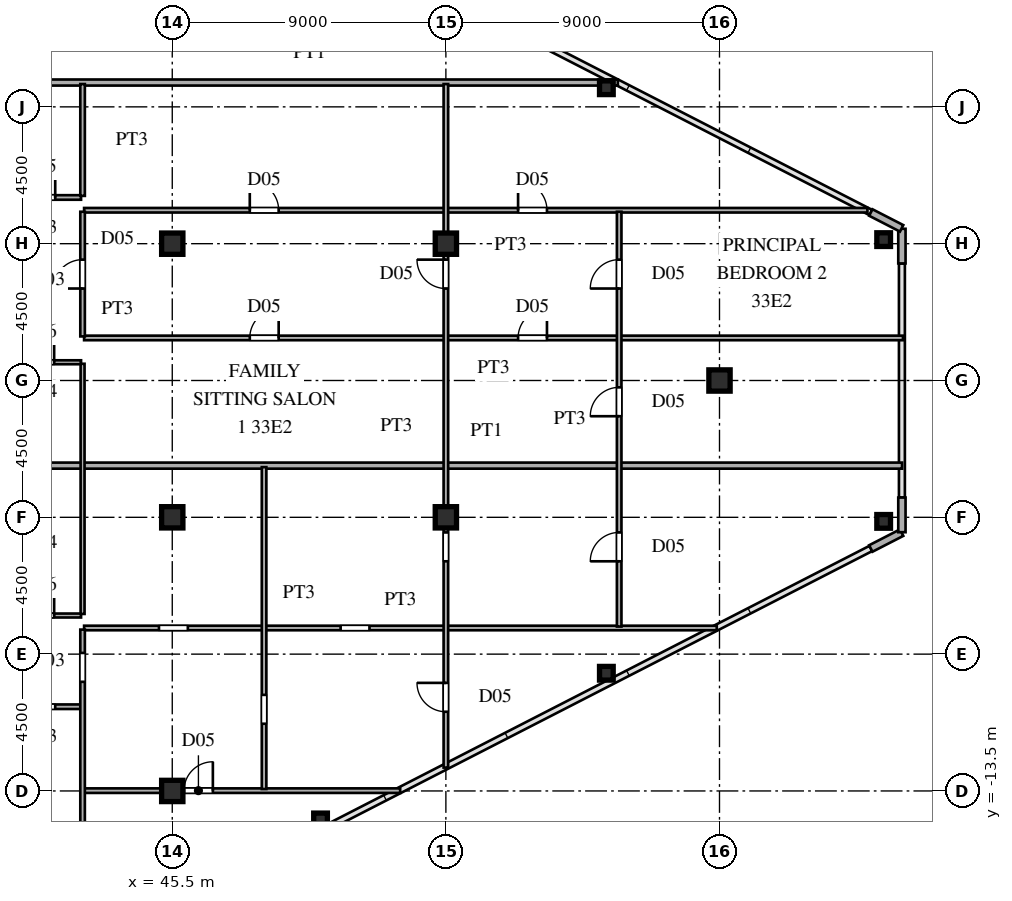
"""IFC4 building model, lengths in metres.
Left out: names, types, materials, properties, quantities, classifications, styles, units other than length and angle.
Written with IfcOpenShell. Run it as: python <this file> out.ifc"""

import sys

from ifc_helpers import new_model, si_unit, direction, frame, frame_2d, origin, origin_2d, place, context, subcontext, project, spatial, rectangle, hollow_rectangle, i_section, extrude, source, transform, mapped, element, fill, save


model = new_model("IFC4")
c1 = context("Model", 3, precision=1e-05, world=origin(), true_north=direction((0.0, 1.0)))
c2 = subcontext(c1, "Body", "Model", "MODEL_VIEW")
j1 = project(units=[si_unit("LENGTHUNIT", "METRE"), si_unit("PLANEANGLEUNIT", "RADIAN")], contexts=[c1])
p1 = place(None, origin())
s1 = spatial("IfcSite", under=j1, at=p1, CompositionType="ELEMENT")
p2 = place(p1, origin())
s2 = spatial("IfcBuilding", under=s1, at=p2, CompositionType="ELEMENT")
p3 = place(p2, frame((0.0, 0.0, 124.8)))
s3 = spatial("IfcBuildingStorey", under=s2, at=p3, CompositionType="ELEMENT", Elevation=124.8)
m1 = source(origin(), c2, "Body", "SweptSolid", [
    extrude(i_section(OverallWidth=0.7, OverallDepth=0.7, WebThickness=0.028, FlangeThickness=0.045, at=origin_2d()), origin(), (0.0, 0.0, 1.0), 3.6),
])
for number, where, z_axis, x_axis in (
    (1, (45.5, -13.5, 0.0), (0.0, 0.0, 1.0), (1.0, 0.0, 0.0)),
    (2, (45.5, -4.5, 0.0), (0.0, 0.0, 1.0), (1.0, 0.0, 0.0)),
    (3, (45.5, 4.5, 0.0), (0.0, 0.0, 1.0), (1.0, 0.0, 0.0)),
    (4, (54.5, -4.5, 0.0), (0.0, 0.0, 1.0), (1.0, 0.0, 0.0)),
    (5, (54.5, 4.5, 0.0), (0.0, 0.0, 1.0), (1.0, 0.0, 0.0)),
    (6, (63.5, 0.0, 0.0), (0.0, 0.0, 1.0), (1.0, 0.0, 0.0)),
):
    element("IfcColumn", number, at=place(p3, frame(where, z_axis=z_axis, x_axis=x_axis)), inside=s3, PredefinedType="COLUMN", context=c2, shape_type="MappedRepresentation", body=[
        mapped(m1, transform((0.0, 0.0, 0.0), scale=1.0)),
    ])
m2 = source(origin(), c2, "Body", "SweptSolid", [
    extrude(hollow_rectangle(XDim=0.45, YDim=0.45, WallThickness=0.018, at=origin_2d()), origin(), (0.0, 0.0, 1.0), 3.6),
])
for number, where, z_axis, x_axis in (
    (7, (68.9, -4.634, 0.0), (0.0, 0.0, 1.0), (1.0, 0.0, 0.0)),
    (8, (68.9, 4.634, 0.0), (0.0, 0.0, 1.0), (1.0, 0.0, 0.0)),
    (9, (50.377, -14.453, 0.0), (0.0, 0.0, 1.0), (1.0, 0.0, 0.0)),
    (10, (59.779, -9.629, 0.0), (0.0, 0.0, 1.0), (1.0, 0.0, 0.0)),
    (11, (59.779, 9.629, 0.0), (0.0, 0.0, 1.0), (1.0, 0.0, 0.0)),
):
    element("IfcColumn", number, at=place(p3, frame(where, z_axis=z_axis, x_axis=x_axis)), inside=s3, PredefinedType="COLUMN", context=c2, shape_type="MappedRepresentation", body=[
        mapped(m2, transform((0.0, 0.0, 0.0), scale=1.0)),
    ])
p4 = place(p3, frame((68.477, -5.525, 0.0), z_axis=(0.0, 0.0, 1.0), x_axis=(0.889797395748, 0.456355776255, 0.0)))
e12 = element("IfcWall", 12, at=p4, inside=s3, PredefinedType="SOLIDWALL", context=c2, shape_type="SweptSolid", body=[
    extrude(rectangle(XDim=1.14, YDim=0.24, at=frame_2d((0.57, 0.0))), origin(), (0.0, 0.0, 1.0), 3.38),
])
for number, where, z_axis, x_axis in (
    (13, (69.5, -4.99, 0.0), (0.0, 0.0, 1.0), (0.0, 1.0, 0.0)),
    (14, (69.5, 3.85, 0.0), (0.0, 0.0, 1.0), (0.0, 1.0, 0.0)),
):
    element("IfcWall", number, at=place(p3, frame(where, z_axis=z_axis, x_axis=x_axis)), inside=s3, PredefinedType="SOLIDWALL", context=c2, shape_type="SweptSolid", body=[
        extrude(rectangle(XDim=1.14, YDim=0.24, at=frame_2d((0.57, 0.0))), origin(), (0.0, 0.0, 1.0), 3.38),
    ])
p5 = place(p3, frame((69.491, 5.005, 0.0), z_axis=(0.0, 0.0, 1.0), x_axis=(-0.889797395748, 0.456355776255, 0.0)))
e15 = element("IfcWall", 15, at=p5, inside=s3, PredefinedType="SOLIDWALL", context=c2, shape_type="SweptSolid", body=[
    extrude(rectangle(XDim=1.14, YDim=0.24, at=frame_2d((0.57, 0.0))), origin(), (0.0, 0.0, 1.0), 3.38),
])
p6 = place(p3, frame((42.6, -13.49, 0.0), z_axis=(0.0, 0.0, 1.0), x_axis=(1.0, 0.0, 0.0)))
e16 = element("IfcWall", 16, at=p6, inside=s3, PredefinedType="PARTITIONING", context=c2, shape_type="SweptSolid", body=[
    extrude(rectangle(XDim=10.397, YDim=0.15, at=frame_2d((5.198, 0.0))), origin(), (0.0, 0.0, 1.0), 2.78),
])
p7 = place(p6, frame((3.285, 0.0, 0.0)))
e17 = element("IfcOpeningElement", 17, at=p7, cuts=e16, PredefinedType="OPENING", context=c2, shape_type="SweptSolid", body=[
    extrude(rectangle(XDim=0.95, YDim=2.15, at=frame_2d((0.475, 1.075))), frame((0.0, 0.085, 0.0), z_axis=(0.0, -1.0, 0.0), x_axis=(1.0, 0.0, 0.0)), (0.0, 0.0, 1.0), 0.17),
])
p8 = place(p3, frame((39.85, -10.73, 0.0), z_axis=(0.0, 0.0, 1.0), x_axis=(1.0, 0.0, 0.0)))
e18 = element("IfcWall", 18, at=p8, inside=s3, PredefinedType="PARTITIONING", context=c2, shape_type="SweptSolid", body=[
    extrude(rectangle(XDim=2.65, YDim=0.15, at=frame_2d((1.325, 0.0))), origin(), (0.0, 0.0, 1.0), 3.38),
])
p9 = place(p8, frame((0.85, 0.0, 0.0)))
e19 = element("IfcOpeningElement", 19, at=p9, cuts=e18, PredefinedType="OPENING", context=c2, shape_type="SweptSolid", body=[
    extrude(rectangle(XDim=0.95, YDim=2.15, at=frame_2d((0.475, 1.075))), frame((0.0, 0.085, 0.0), z_axis=(0.0, -1.0, 0.0), x_axis=(1.0, 0.0, 0.0)), (0.0, 0.0, 1.0), 0.17),
])
p10 = place(p3, frame((42.6, -8.14, 0.0), z_axis=(0.0, 0.0, 1.0), x_axis=(1.0, 0.0, 0.0)))
e20 = element("IfcWall", 20, at=p10, inside=s3, PredefinedType="PARTITIONING", context=c2, shape_type="SweptSolid", body=[
    extrude(rectangle(XDim=20.81, YDim=0.15, at=frame_2d((10.405, 0.0))), origin(), (0.0, 0.0, 1.0), 3.38),
])
p11 = place(p10, frame((2.462, 0.0, 0.0)))
e21 = element("IfcOpeningElement", 21, at=p11, cuts=e20, PredefinedType="OPENING", context=c2, shape_type="SweptSolid", body=[
    extrude(rectangle(XDim=0.95, YDim=2.15, at=frame_2d((0.475, 1.075))), frame((0.0, 0.085, 0.0), z_axis=(0.0, -1.0, 0.0), x_axis=(1.0, 0.0, 0.0)), (0.0, 0.0, 1.0), 0.17),
])
p12 = place(p10, frame((8.438, 0.0, 0.0)))
e22 = element("IfcOpeningElement", 22, at=p12, cuts=e20, PredefinedType="OPENING", context=c2, shape_type="SweptSolid", body=[
    extrude(rectangle(XDim=0.95, YDim=2.15, at=frame_2d((0.475, 1.075))), frame((0.0, 0.085, 0.0), z_axis=(0.0, -1.0, 0.0), x_axis=(1.0, 0.0, 0.0)), (0.0, 0.0, 1.0), 0.17),
])
p13 = place(p3, frame((39.85, -7.73, 0.0), z_axis=(0.0, 0.0, 1.0), x_axis=(1.0, 0.0, 0.0)))
e23 = element("IfcWall", 23, at=p13, inside=s3, PredefinedType="PARTITIONING", context=c2, shape_type="SweptSolid", body=[
    extrude(rectangle(XDim=2.65, YDim=0.13, at=frame_2d((1.325, 0.0))), origin(), (0.0, 0.0, 1.0), 3.38),
])
p14 = place(p13, frame((0.885, 0.0, 0.0)))
e24 = element("IfcOpeningElement", 24, at=p14, cuts=e23, PredefinedType="OPENING", context=c2, shape_type="SweptSolid", body=[
    extrude(rectangle(XDim=0.88, YDim=2.1, at=frame_2d((0.44, 1.05))), frame((0.0, 0.075, 0.0), z_axis=(0.0, -1.0, 0.0), x_axis=(1.0, 0.0, 0.0)), (0.0, 0.0, 1.0), 0.15),
])
p15 = place(p3, frame((39.88, -2.8, 0.0), z_axis=(0.0, 0.0, 1.0), x_axis=(1.0, 0.0, 0.0)))
e25 = element("IfcWall", 25, at=p15, inside=s3, PredefinedType="PARTITIONING", context=c2, shape_type="SweptSolid", body=[
    extrude(rectangle(XDim=29.625, YDim=0.2, at=frame_2d((14.812, 0.0))), origin(), (0.0, 0.0, 1.0), 3.38),
])
p16 = place(p3, frame((39.85, 0.6, 0.0), z_axis=(0.0, 0.0, 1.0), x_axis=(1.0, 0.0, 0.0)))
e26 = element("IfcWall", 26, at=p16, inside=s3, PredefinedType="PARTITIONING", context=c2, shape_type="SweptSolid", body=[
    extrude(rectangle(XDim=2.65, YDim=0.13, at=frame_2d((1.325, 0.0))), origin(), (0.0, 0.0, 1.0), 3.38),
])
p17 = place(p16, frame((0.885, 0.0, 0.0)))
e27 = element("IfcOpeningElement", 27, at=p17, cuts=e26, PredefinedType="OPENING", context=c2, shape_type="SweptSolid", body=[
    extrude(rectangle(XDim=0.88, YDim=2.1, at=frame_2d((0.44, 1.05))), frame((0.0, 0.075, 0.0), z_axis=(0.0, -1.0, 0.0), x_axis=(1.0, 0.0, 0.0)), (0.0, 0.0, 1.0), 0.15),
])
p18 = place(p3, frame((42.6, 1.4, 0.0), z_axis=(0.0, 0.0, 1.0), x_axis=(1.0, 0.0, 0.0)))
e28 = element("IfcWall", 28, at=p18, inside=s3, PredefinedType="PARTITIONING", context=c2, shape_type="SweptSolid", body=[
    extrude(rectangle(XDim=26.935, YDim=0.15, at=frame_2d((13.467, 0.0))), origin(), (0.0, 0.0, 1.0), 3.38),
])
p19 = place(p18, frame((5.45, 0.0, 0.0)))
e29 = element("IfcOpeningElement", 29, at=p19, cuts=e28, PredefinedType="OPENING", context=c2, shape_type="SweptSolid", body=[
    extrude(rectangle(XDim=0.95, YDim=2.15, at=frame_2d((0.475, 1.075))), frame((0.0, 0.085, 0.0), z_axis=(0.0, -1.0, 0.0), x_axis=(1.0, 0.0, 0.0)), (0.0, 0.0, 1.0), 0.17),
])
p20 = place(p18, frame((14.275, 0.0, 0.0)))
e30 = element("IfcOpeningElement", 30, at=p20, cuts=e28, PredefinedType="OPENING", context=c2, shape_type="SweptSolid", body=[
    extrude(rectangle(XDim=0.95, YDim=2.15, at=frame_2d((0.475, 1.075))), frame((0.0, 0.085, 0.0), z_axis=(0.0, -1.0, 0.0), x_axis=(1.0, 0.0, 0.0)), (0.0, 0.0, 1.0), 0.17),
])
p21 = place(p3, frame((42.6, 5.6, 0.0), z_axis=(0.0, 0.0, 1.0), x_axis=(1.0, 0.0, 0.0)))
e31 = element("IfcWall", 31, at=p21, inside=s3, PredefinedType="PARTITIONING", context=c2, shape_type="SweptSolid", body=[
    extrude(rectangle(XDim=25.766, YDim=0.15, at=frame_2d((12.883, 0.0))), origin(), (0.0, 0.0, 1.0), 3.38),
])
p22 = place(p21, frame((5.45, 0.0, 0.0)))
e32 = element("IfcOpeningElement", 32, at=p22, cuts=e31, PredefinedType="OPENING", context=c2, shape_type="SweptSolid", body=[
    extrude(rectangle(XDim=0.95, YDim=2.15, at=frame_2d((0.475, 1.075))), frame((0.0, 0.085, 0.0), z_axis=(0.0, -1.0, 0.0), x_axis=(1.0, 0.0, 0.0)), (0.0, 0.0, 1.0), 0.17),
])
p23 = place(p21, frame((14.275, 0.0, 0.0)))
e33 = element("IfcOpeningElement", 33, at=p23, cuts=e31, PredefinedType="OPENING", context=c2, shape_type="SweptSolid", body=[
    extrude(rectangle(XDim=0.95, YDim=2.15, at=frame_2d((0.475, 1.075))), frame((0.0, 0.085, 0.0), z_axis=(0.0, -1.0, 0.0), x_axis=(1.0, 0.0, 0.0)), (0.0, 0.0, 1.0), 0.17),
])
p24 = place(p3, frame((39.85, 6.02, 0.0), z_axis=(0.0, 0.0, 1.0), x_axis=(1.0, 0.0, 0.0)))
e34 = element("IfcWall", 34, at=p24, inside=s3, PredefinedType="PARTITIONING", context=c2, shape_type="SweptSolid", body=[
    extrude(rectangle(XDim=2.65, YDim=0.15, at=frame_2d((1.325, 0.0))), origin(), (0.0, 0.0, 1.0), 3.38),
])
p25 = place(p24, frame((0.85, 0.0, 0.0)))
e35 = element("IfcOpeningElement", 35, at=p25, cuts=e34, PredefinedType="OPENING", context=c2, shape_type="SweptSolid", body=[
    extrude(rectangle(XDim=0.95, YDim=2.15, at=frame_2d((0.475, 1.075))), frame((0.0, 0.085, 0.0), z_axis=(0.0, -1.0, 0.0), x_axis=(1.0, 0.0, 0.0)), (0.0, 0.0, 1.0), 0.17),
])
p26 = place(p3, frame((39.88, 9.8, 0.0), z_axis=(0.0, 0.0, 1.0), x_axis=(1.0, 0.0, 0.0)))
e36 = element("IfcWall", 36, at=p26, inside=s3, PredefinedType="PARTITIONING", context=c2, shape_type="SweptSolid", body=[
    extrude(rectangle(XDim=20.277, YDim=0.2, at=frame_2d((10.139, 0.0))), origin(), (0.0, 0.0, 1.0), 3.38),
])
p27 = place(p3, frame((42.55, -18.865, 0.0), z_axis=(0.0, 0.0, 1.0), x_axis=(0.0, 1.0, 0.0)))
e37 = element("IfcWall", 37, at=p27, inside=s3, PredefinedType="PARTITIONING", context=c2, shape_type="SweptSolid", body=[
    extrude(rectangle(XDim=10.672, YDim=0.15, at=frame_2d((5.336, 0.0))), origin(), (0.0, 0.0, 1.0), 3.38),
])
p28 = place(p27, frame((8.955, 0.0, 0.0)))
e38 = element("IfcOpeningElement", 38, at=p28, cuts=e37, PredefinedType="OPENING", context=c2, shape_type="SweptSolid", body=[
    extrude(rectangle(XDim=0.95, YDim=2.15, at=frame_2d((0.475, 1.075))), frame((0.0, 0.085, 0.0), z_axis=(0.0, -1.0, 0.0), x_axis=(1.0, 0.0, 0.0)), (0.0, 0.0, 1.0), 0.17),
])
p29 = place(p3, frame((42.55, -7.678, 0.0), z_axis=(0.0, 0.0, 1.0), x_axis=(0.0, 1.0, 0.0)))
e39 = element("IfcWall", 39, at=p29, inside=s3, PredefinedType="PARTITIONING", context=c2, shape_type="SweptSolid", body=[
    extrude(rectangle(XDim=8.228, YDim=0.13, at=frame_2d((4.114, 0.0))), origin(), (0.0, 0.0, 1.0), 3.38),
])
p30 = place(p3, frame((42.55, 1.45, 0.0), z_axis=(0.0, 0.0, 1.0), x_axis=(0.0, 1.0, 0.0)))
e40 = element("IfcWall", 40, at=p30, inside=s3, PredefinedType="PARTITIONING", context=c2, shape_type="SweptSolid", body=[
    extrude(rectangle(XDim=4.1, YDim=0.15, at=frame_2d((2.05, 0.0))), origin(), (0.0, 0.0, 1.0), 3.38),
])
p31 = place(p30, frame((1.575, 0.0, 0.0)))
e41 = element("IfcOpeningElement", 41, at=p31, cuts=e40, PredefinedType="OPENING", context=c2, shape_type="SweptSolid", body=[
    extrude(rectangle(XDim=0.95, YDim=2.15, at=frame_2d((0.475, 1.075))), frame((0.0, 0.085, 0.0), z_axis=(0.0, -1.0, 0.0), x_axis=(1.0, 0.0, 0.0)), (0.0, 0.0, 1.0), 0.17),
])
p32 = place(p3, frame((42.55, 6.072, 0.0), z_axis=(0.0, 0.0, 1.0), x_axis=(0.0, 1.0, 0.0)))
e42 = element("IfcWall", 42, at=p32, inside=s3, PredefinedType="PARTITIONING", context=c2, shape_type="SweptSolid", body=[
    extrude(rectangle(XDim=3.678, YDim=0.15, at=frame_2d((1.839, 0.0))), origin(), (0.0, 0.0, 1.0), 3.38),
])
p33 = place(p3, frame((48.52, -13.436, 0.0), z_axis=(0.0, 0.0, 1.0), x_axis=(0.0, 1.0, 0.0)))
e43 = element("IfcWall", 43, at=p33, inside=s3, PredefinedType="PARTITIONING", context=c2, shape_type="SweptSolid", body=[
    extrude(rectangle(XDim=10.586, YDim=0.15, at=frame_2d((5.293, 0.0))), origin(), (0.0, 0.0, 1.0), 3.38),
])
p34 = place(p33, frame((2.146, 0.0, 0.0)))
e44 = element("IfcOpeningElement", 44, at=p34, cuts=e43, PredefinedType="OPENING", context=c2, shape_type="SweptSolid", body=[
    extrude(rectangle(XDim=0.95, YDim=2.15, at=frame_2d((0.475, 1.075))), frame((0.0, 0.085, 0.0), z_axis=(0.0, -1.0, 0.0), x_axis=(1.0, 0.0, 0.0)), (0.0, 0.0, 1.0), 0.17),
])
p35 = place(p3, frame((54.5, -12.732, 0.0), z_axis=(0.0, 0.0, 1.0), x_axis=(0.0, 1.0, 0.0)))
e45 = element("IfcWall", 45, at=p35, inside=s3, PredefinedType="PARTITIONING", context=c2, shape_type="SweptSolid", body=[
    extrude(rectangle(XDim=22.482, YDim=0.15, at=frame_2d((11.241, 0.0))), origin(), (0.0, 0.0, 1.0), 2.78),
])
p36 = place(p35, frame((1.837, 0.0, 0.0)))
e46 = element("IfcOpeningElement", 46, at=p36, cuts=e45, PredefinedType="OPENING", context=c2, shape_type="SweptSolid", body=[
    extrude(rectangle(XDim=0.95, YDim=2.15, at=frame_2d((0.475, 1.075))), frame((0.0, 0.085, 0.0), z_axis=(0.0, -1.0, 0.0), x_axis=(1.0, 0.0, 0.0)), (0.0, 0.0, 1.0), 0.17),
])
p37 = place(p35, frame((6.785, 0.0, 0.0)))
e47 = element("IfcOpeningElement", 47, at=p37, cuts=e45, PredefinedType="OPENING", context=c2, shape_type="SweptSolid", body=[
    extrude(rectangle(XDim=0.95, YDim=2.15, at=frame_2d((0.475, 1.075))), frame((0.0, 0.085, 0.0), z_axis=(0.0, -1.0, 0.0), x_axis=(1.0, 0.0, 0.0)), (0.0, 0.0, 1.0), 0.17),
])
p38 = place(p35, frame((15.757, 0.0, 0.0)))
e48 = element("IfcOpeningElement", 48, at=p38, cuts=e45, PredefinedType="OPENING", context=c2, shape_type="SweptSolid", body=[
    extrude(rectangle(XDim=0.95, YDim=2.15, at=frame_2d((0.475, 1.075))), frame((0.0, 0.085, 0.0), z_axis=(0.0, -1.0, 0.0), x_axis=(1.0, 0.0, 0.0)), (0.0, 0.0, 1.0), 0.17),
])
p39 = place(p3, frame((60.2, -8.093, 0.0), z_axis=(0.0, 0.0, 1.0), x_axis=(0.0, 1.0, 0.0)))
e49 = element("IfcWall", 49, at=p39, inside=s3, PredefinedType="PARTITIONING", context=c2, shape_type="SweptSolid", body=[
    extrude(rectangle(XDim=13.643, YDim=0.15, at=frame_2d((6.822, 0.0))), origin(), (0.0, 0.0, 1.0), 3.38),
])
p40 = place(p39, frame((2.146, 0.0, 0.0)))
e50 = element("IfcOpeningElement", 50, at=p40, cuts=e49, PredefinedType="OPENING", context=c2, shape_type="SweptSolid", body=[
    extrude(rectangle(XDim=0.95, YDim=2.15, at=frame_2d((0.475, 1.075))), frame((0.0, 0.085, 0.0), z_axis=(0.0, -1.0, 0.0), x_axis=(1.0, 0.0, 0.0)), (0.0, 0.0, 1.0), 0.17),
])
p41 = place(p39, frame((6.918, 0.0, 0.0)))
e51 = element("IfcOpeningElement", 51, at=p41, cuts=e49, PredefinedType="OPENING", context=c2, shape_type="SweptSolid", body=[
    extrude(rectangle(XDim=0.95, YDim=2.15, at=frame_2d((0.475, 1.075))), frame((0.0, 0.085, 0.0), z_axis=(0.0, -1.0, 0.0), x_axis=(1.0, 0.0, 0.0)), (0.0, 0.0, 1.0), 0.17),
])
p42 = place(p39, frame((11.118, 0.0, 0.0)))
e52 = element("IfcOpeningElement", 52, at=p42, cuts=e49, PredefinedType="OPENING", context=c2, shape_type="SweptSolid", body=[
    extrude(rectangle(XDim=0.95, YDim=2.15, at=frame_2d((0.475, 1.075))), frame((0.0, 0.085, 0.0), z_axis=(0.0, -1.0, 0.0), x_axis=(1.0, 0.0, 0.0)), (0.0, 0.0, 1.0), 0.17),
])
m3 = source(origin(), c2, "Body", "SweptSolid", [
    extrude(rectangle(XDim=0.95, YDim=2.15, at=frame_2d((0.475, 1.075))), frame((0.0, 0.025, 0.0), z_axis=(0.0, -1.0, 0.0), x_axis=(1.0, 0.0, 0.0)), (0.0, 0.0, 1.0), 0.05),
])
p43 = place(p7, origin())
e53 = element("IfcDoor", 53, at=p43, inside=s3, OperationType="SINGLE_SWING_RIGHT", PredefinedType="DOOR", context=c2, shape_type="MappedRepresentation", body=[
    mapped(m3, transform((0.0, 0.0, 0.0), scale=1.0)),
])
fill(e17, e53)
m4 = source(origin(), c2, "Body", "SweptSolid", [
    extrude(rectangle(XDim=0.88, YDim=2.1, at=frame_2d((0.44, 1.05))), frame((0.0, 0.025, 0.0), z_axis=(0.0, -1.0, 0.0), x_axis=(1.0, 0.0, 0.0)), (0.0, 0.0, 1.0), 0.05),
])
p44 = place(p14, origin())
e54 = element("IfcDoor", 54, at=p44, inside=s3, OperationType="SINGLE_SWING_RIGHT", PredefinedType="DOOR", context=c2, shape_type="MappedRepresentation", body=[
    mapped(m4, transform((0.0, 0.0, 0.0), scale=1.0)),
])
fill(e24, e54)
p45 = place(p17, origin())
e55 = element("IfcDoor", 55, at=p45, inside=s3, OperationType="SINGLE_SWING_RIGHT", PredefinedType="DOOR", context=c2, shape_type="MappedRepresentation", body=[
    mapped(m4, transform((0.0, 0.0, 0.0), scale=1.0)),
])
fill(e27, e55)
p46 = place(p19, origin())
e56 = element("IfcDoor", 56, at=p46, inside=s3, OperationType="SINGLE_SWING_RIGHT", PredefinedType="DOOR", context=c2, shape_type="MappedRepresentation", body=[
    mapped(m3, transform((0.0, 0.0, 0.0), scale=1.0)),
])
fill(e29, e56)
p47 = place(p20, origin())
e57 = element("IfcDoor", 57, at=p47, inside=s3, OperationType="SINGLE_SWING_RIGHT", PredefinedType="DOOR", context=c2, shape_type="MappedRepresentation", body=[
    mapped(m3, transform((0.0, 0.0, 0.0), scale=1.0)),
])
fill(e30, e57)
p48 = place(p22, origin())
e58 = element("IfcDoor", 58, at=p48, inside=s3, OperationType="SINGLE_SWING_LEFT", PredefinedType="DOOR", context=c2, shape_type="MappedRepresentation", body=[
    mapped(m3, transform((0.0, 0.0, 0.0), scale=1.0)),
])
fill(e32, e58)
p49 = place(p23, origin())
e59 = element("IfcDoor", 59, at=p49, inside=s3, OperationType="SINGLE_SWING_LEFT", PredefinedType="DOOR", context=c2, shape_type="MappedRepresentation", body=[
    mapped(m3, transform((0.0, 0.0, 0.0), scale=1.0)),
])
fill(e33, e59)
p50 = place(p25, origin())
e60 = element("IfcDoor", 60, at=p50, inside=s3, OperationType="SINGLE_SWING_RIGHT", PredefinedType="DOOR", context=c2, shape_type="MappedRepresentation", body=[
    mapped(m3, transform((0.0, 0.0, 0.0), scale=1.0)),
])
fill(e35, e60)
p51 = place(p31, origin())
e61 = element("IfcDoor", 61, at=p51, inside=s3, OperationType="SINGLE_SWING_LEFT", PredefinedType="DOOR", context=c2, shape_type="MappedRepresentation", body=[
    mapped(m3, transform((0.0, 0.0, 0.0), scale=1.0)),
])
fill(e41, e61)
p52 = place(p36, origin())
e62 = element("IfcDoor", 62, at=p52, inside=s3, OperationType="SINGLE_SWING_RIGHT", PredefinedType="DOOR", context=c2, shape_type="MappedRepresentation", body=[
    mapped(m3, transform((0.0, 0.0, 0.0), scale=1.0)),
])
fill(e46, e62)
p53 = place(p38, origin())
e63 = element("IfcDoor", 63, at=p53, inside=s3, OperationType="SINGLE_SWING_RIGHT", PredefinedType="DOOR", context=c2, shape_type="MappedRepresentation", body=[
    mapped(m3, transform((0.0, 0.0, 0.0), scale=1.0)),
])
fill(e48, e63)
p54 = place(p40, origin())
e64 = element("IfcDoor", 64, at=p54, inside=s3, OperationType="SINGLE_SWING_LEFT", PredefinedType="DOOR", context=c2, shape_type="MappedRepresentation", body=[
    mapped(m3, transform((0.0, 0.0, 0.0), scale=1.0)),
])
fill(e50, e64)
p55 = place(p41, origin())
e65 = element("IfcDoor", 65, at=p55, inside=s3, OperationType="SINGLE_SWING_LEFT", PredefinedType="DOOR", context=c2, shape_type="MappedRepresentation", body=[
    mapped(m3, transform((0.0, 0.0, 0.0), scale=1.0)),
])
fill(e51, e65)
p56 = place(p42, origin())
e66 = element("IfcDoor", 66, at=p56, inside=s3, OperationType="SINGLE_SWING_LEFT", PredefinedType="DOOR", context=c2, shape_type="MappedRepresentation", body=[
    mapped(m3, transform((0.0, 0.0, 0.0), scale=1.0)),
])
fill(e52, e66)
save(model, sys.argv[1])
